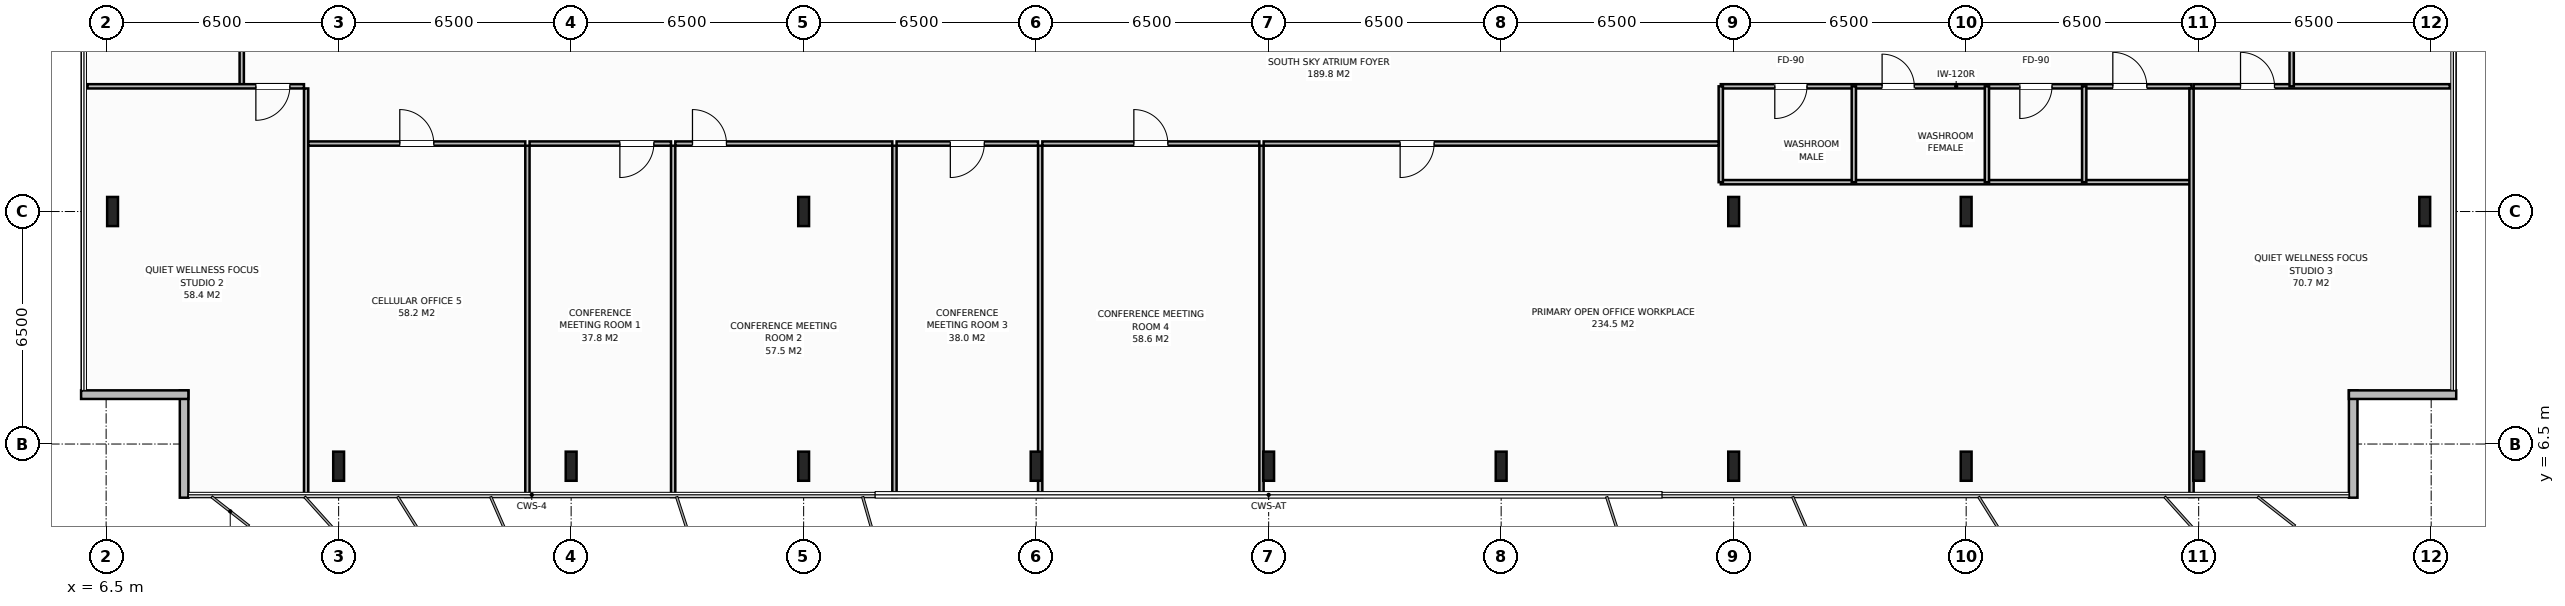
"""IFC4 building model, lengths in metres.
Left out: names, types, materials, properties, quantities, classifications, styles, units other than length and angle.
Written with IfcOpenShell. Run it as: python <this file> out.ifc"""

import sys

from ifc_helpers import new_model, si_unit, direction, frame, frame_2d, origin, origin_2d, place, context, subcontext, project, spatial, rectangle, i_section, extrude, element, fill, save


model = new_model("IFC4")
c1 = context("Model", 3, precision=1e-05, world=origin(), true_north=direction((0.0, 1.0)))
c2 = subcontext(c1, "Body", "Model", "MODEL_VIEW")
j1 = project(units=[si_unit("LENGTHUNIT", "METRE"), si_unit("PLANEANGLEUNIT", "RADIAN")], contexts=[c1])
p1 = place(None, origin())
s1 = spatial("IfcSite", under=j1, at=p1, CompositionType="ELEMENT")
p2 = place(p1, origin())
s2 = spatial("IfcBuilding", under=s1, at=p2, CompositionType="ELEMENT")
p3 = place(p2, frame((0.0, 0.0, 221.4)))
s3 = spatial("IfcBuildingStorey", under=s2, at=p3, CompositionType="ELEMENT", Elevation=221.4)
for number, where, z_axis, x_axis in (
    (1, (58.5, 13.0, 0.0), (0.0, 0.0, 1.0), (1.0, 0.0, 0.0)),
    (2, (26.0, 13.0, 0.0), (0.0, 0.0, 1.0), (1.0, 0.0, 0.0)),
    (3, (52.0, 13.0, 0.0), (0.0, 0.0, 1.0), (1.0, 0.0, 0.0)),
    (4, (13.0, 5.88, 0.0), (0.0, 0.0, 1.0), (1.0, 0.0, 0.0)),
    (5, (19.5, 5.88, 0.0), (0.0, 0.0, 1.0), (1.0, 0.0, 0.0)),
    (6, (26.0, 5.88, 0.0), (0.0, 0.0, 1.0), (1.0, 0.0, 0.0)),
    (7, (32.5, 5.88, 0.0), (0.0, 0.0, 1.0), (1.0, 0.0, 0.0)),
    (8, (39.0, 5.88, 0.0), (0.0, 0.0, 1.0), (1.0, 0.0, 0.0)),
    (9, (45.5, 5.88, 0.0), (0.0, 0.0, 1.0), (1.0, 0.0, 0.0)),
    (10, (52.0, 5.88, 0.0), (0.0, 0.0, 1.0), (1.0, 0.0, 0.0)),
    (11, (58.5, 5.88, 0.0), (0.0, 0.0, 1.0), (1.0, 0.0, 0.0)),
    (12, (65.0, 5.88, 0.0), (0.0, 0.0, 1.0), (1.0, 0.0, 0.0)),
    (13, (6.68, 13.0, 0.0), (0.0, 0.0, 1.0), (1.0, 0.0, 0.0)),
    (14, (71.32, 13.0, 0.0), (0.0, 0.0, 1.0), (1.0, 0.0, 0.0)),
):
    element("IfcColumn", number, at=place(p3, frame(where, z_axis=z_axis, x_axis=x_axis)), inside=s3, PredefinedType="COLUMN", context=c2, shape_type="SweptSolid", body=[
        extrude(i_section(OverallWidth=0.303, OverallDepth=0.814, WebThickness=0.021, FlangeThickness=0.04, at=origin_2d()), origin(), (0.0, 0.0, 1.0), 3.8),
    ])
for number, where, z_axis, x_axis in (
    (15, (8.68, 5.0, 0.0), (0.0, 0.0, 1.0), (0.0, 1.0, 0.0)),
    (16, (8.8, 7.88, 0.0), (0.0, 0.0, 1.0), (-1.0, 0.0, 0.0)),
    (17, (69.32, 8.0, 0.0), (0.0, 0.0, 1.0), (0.0, -1.0, 0.0)),
    (18, (72.2, 7.88, 0.0), (0.0, 0.0, 1.0), (-1.0, 0.0, 0.0)),
):
    element("IfcWall", number, at=place(p3, frame(where, z_axis=z_axis, x_axis=x_axis)), inside=s3, PredefinedType="STANDARD", context=c2, shape_type="SweptSolid", body=[
        extrude(rectangle(XDim=3.0, YDim=0.24, at=frame_2d((1.5, 0.0))), origin(), (0.0, 0.0, 1.0), 3.58),
    ])
p4 = place(p3, frame((10.291, 16.5, 0.0), z_axis=(0.0, 0.0, 1.0), x_axis=(0.0, 1.0, 0.0)))
e19 = element("IfcWall", 19, at=p4, inside=s3, PredefinedType="PARTITIONING", context=c2, shape_type="SweptSolid", body=[
    extrude(rectangle(XDim=2.1, YDim=0.12, at=frame_2d((1.05, 0.0))), origin(), (0.0, 0.0, 1.0), 3.58),
])
p5 = place(p3, frame((51.64, 16.5, 0.0), z_axis=(0.0, 0.0, 1.0), x_axis=(1.0, 0.0, 0.0)))
e20 = element("IfcWall", 20, at=p5, inside=s3, PredefinedType="PARTITIONING", context=c2, shape_type="SweptSolid", body=[
    extrude(rectangle(XDim=13.16, YDim=0.12, at=frame_2d((6.58, 0.0))), origin(), (0.0, 0.0, 1.0), 3.58),
])
p6 = place(p5, frame((1.51, 0.0, 0.0)))
e21 = element("IfcOpeningElement", 21, at=p6, cuts=e20, PredefinedType="OPENING", context=c2, shape_type="SweptSolid", body=[
    extrude(rectangle(XDim=0.9, YDim=2.15, at=frame_2d((0.45, 1.075))), frame((0.0, 0.07, 0.0), z_axis=(0.0, -1.0, 0.0), x_axis=(1.0, 0.0, 0.0)), (0.0, 0.0, 1.0), 0.14),
])
p7 = place(p5, frame((4.51, 0.0, 0.0)))
e22 = element("IfcOpeningElement", 22, at=p7, cuts=e20, PredefinedType="OPENING", context=c2, shape_type="SweptSolid", body=[
    extrude(rectangle(XDim=0.9, YDim=2.15, at=frame_2d((0.45, 1.075))), frame((0.0, 0.07, 0.0), z_axis=(0.0, -1.0, 0.0), x_axis=(1.0, 0.0, 0.0)), (0.0, 0.0, 1.0), 0.14),
])
p8 = place(p5, frame((8.36, 0.0, 0.0)))
e23 = element("IfcOpeningElement", 23, at=p8, cuts=e20, PredefinedType="OPENING", context=c2, shape_type="SweptSolid", body=[
    extrude(rectangle(XDim=0.9, YDim=2.15, at=frame_2d((0.45, 1.075))), frame((0.0, 0.07, 0.0), z_axis=(0.0, -1.0, 0.0), x_axis=(1.0, 0.0, 0.0)), (0.0, 0.0, 1.0), 0.14),
])
p9 = place(p5, frame((10.96, 0.0, 0.0)))
e24 = element("IfcOpeningElement", 24, at=p9, cuts=e20, PredefinedType="OPENING", context=c2, shape_type="SweptSolid", body=[
    extrude(rectangle(XDim=0.95, YDim=2.15, at=frame_2d((0.475, 1.075))), frame((0.0, 0.07, 0.0), z_axis=(0.0, -1.0, 0.0), x_axis=(1.0, 0.0, 0.0)), (0.0, 0.0, 1.0), 0.14),
])
p10 = place(p3, frame((51.64, 13.82, 0.0), z_axis=(0.0, 0.0, 1.0), x_axis=(1.0, 0.0, 0.0)))
e25 = element("IfcWall", 25, at=p10, inside=s3, PredefinedType="PARTITIONING", context=c2, shape_type="SweptSolid", body=[
    extrude(rectangle(XDim=13.16, YDim=0.12, at=frame_2d((6.58, 0.0))), origin(), (0.0, 0.0, 1.0), 3.58),
])
for number, where, z_axis, x_axis in (
    (26, (51.64, 13.82, 0.0), (0.0, 0.0, 1.0), (0.0, 1.0, 0.0)),
    (27, (55.36, 13.82, 0.0), (0.0, 0.0, 1.0), (0.0, 1.0, 0.0)),
    (28, (59.08, 13.82, 0.0), (0.0, 0.0, 1.0), (0.0, 1.0, 0.0)),
    (29, (61.8, 13.82, 0.0), (0.0, 0.0, 1.0), (0.0, 1.0, 0.0)),
):
    element("IfcWall", number, at=place(p3, frame(where, z_axis=z_axis, x_axis=x_axis)), inside=s3, PredefinedType="PARTITIONING", context=c2, shape_type="SweptSolid", body=[
        extrude(rectangle(XDim=2.68, YDim=0.12, at=frame_2d((1.34, 0.0))), origin(), (0.0, 0.0, 1.0), 3.58),
    ])
p11 = place(p3, frame((12.091, 5.02, 0.0), z_axis=(0.0, 0.0, 1.0), x_axis=(0.0, 1.0, 0.0)))
e30 = element("IfcWall", 30, at=p11, inside=s3, PredefinedType="PARTITIONING", context=c2, shape_type="SweptSolid", body=[
    extrude(rectangle(XDim=11.42, YDim=0.12, at=frame_2d((5.71, 0.0))), origin(), (0.0, 0.0, 1.0), 3.58),
])
p12 = place(p3, frame((5.98, 16.5, 0.0), z_axis=(0.0, 0.0, 1.0), x_axis=(1.0, 0.0, 0.0)))
e31 = element("IfcWall", 31, at=p12, inside=s3, PredefinedType="PARTITIONING", context=c2, shape_type="SweptSolid", body=[
    extrude(rectangle(XDim=6.051, YDim=0.12, at=frame_2d((3.026, 0.0))), origin(), (0.0, 0.0, 1.0), 3.58),
])
p13 = place(p12, frame((4.706, 0.0, 0.0)))
e32 = element("IfcOpeningElement", 32, at=p13, cuts=e31, PredefinedType="OPENING", context=c2, shape_type="SweptSolid", body=[
    extrude(rectangle(XDim=0.95, YDim=2.15, at=frame_2d((0.475, 1.075))), frame((0.0, 0.07, 0.0), z_axis=(0.0, -1.0, 0.0), x_axis=(1.0, 0.0, 0.0)), (0.0, 0.0, 1.0), 0.14),
])
p14 = place(p3, frame((18.278, 5.02, 0.0), z_axis=(0.0, 0.0, 1.0), x_axis=(0.0, 1.0, 0.0)))
e33 = element("IfcWall", 33, at=p14, inside=s3, PredefinedType="PARTITIONING", context=c2, shape_type="SweptSolid", body=[
    extrude(rectangle(XDim=9.82, YDim=0.12, at=frame_2d((4.91, 0.0))), origin(), (0.0, 0.0, 1.0), 3.58),
])
p15 = place(p3, frame((12.151, 14.9, 0.0), z_axis=(0.0, 0.0, 1.0), x_axis=(1.0, 0.0, 0.0)))
e34 = element("IfcWall", 34, at=p15, inside=s3, PredefinedType="PARTITIONING", context=c2, shape_type="SweptSolid", body=[
    extrude(rectangle(XDim=6.067, YDim=0.12, at=frame_2d((3.033, 0.0))), origin(), (0.0, 0.0, 1.0), 3.58),
])
p16 = place(p15, frame((2.558, 0.0, 0.0)))
e35 = element("IfcOpeningElement", 35, at=p16, cuts=e34, PredefinedType="OPENING", context=c2, shape_type="SweptSolid", body=[
    extrude(rectangle(XDim=0.95, YDim=2.15, at=frame_2d((0.475, 1.075))), frame((0.0, 0.07, 0.0), z_axis=(0.0, -1.0, 0.0), x_axis=(1.0, 0.0, 0.0)), (0.0, 0.0, 1.0), 0.14),
])
p17 = place(p3, frame((22.352, 5.02, 0.0), z_axis=(0.0, 0.0, 1.0), x_axis=(0.0, 1.0, 0.0)))
e36 = element("IfcWall", 36, at=p17, inside=s3, PredefinedType="PARTITIONING", context=c2, shape_type="SweptSolid", body=[
    extrude(rectangle(XDim=9.82, YDim=0.12, at=frame_2d((4.91, 0.0))), origin(), (0.0, 0.0, 1.0), 3.58),
])
p18 = place(p3, frame((18.338, 14.9, 0.0), z_axis=(0.0, 0.0, 1.0), x_axis=(1.0, 0.0, 0.0)))
e37 = element("IfcWall", 37, at=p18, inside=s3, PredefinedType="PARTITIONING", context=c2, shape_type="SweptSolid", body=[
    extrude(rectangle(XDim=3.954, YDim=0.12, at=frame_2d((1.977, 0.0))), origin(), (0.0, 0.0, 1.0), 3.58),
])
p19 = place(p18, frame((2.524, 0.0, 0.0)))
e38 = element("IfcOpeningElement", 38, at=p19, cuts=e37, PredefinedType="OPENING", context=c2, shape_type="SweptSolid", body=[
    extrude(rectangle(XDim=0.95, YDim=2.15, at=frame_2d((0.475, 1.075))), frame((0.0, 0.07, 0.0), z_axis=(0.0, -1.0, 0.0), x_axis=(1.0, 0.0, 0.0)), (0.0, 0.0, 1.0), 0.14),
])
p20 = place(p3, frame((28.539, 5.02, 0.0), z_axis=(0.0, 0.0, 1.0), x_axis=(0.0, 1.0, 0.0)))
e39 = element("IfcWall", 39, at=p20, inside=s3, PredefinedType="PARTITIONING", context=c2, shape_type="SweptSolid", body=[
    extrude(rectangle(XDim=9.82, YDim=0.12, at=frame_2d((4.91, 0.0))), origin(), (0.0, 0.0, 1.0), 3.58),
])
p21 = place(p3, frame((22.412, 14.9, 0.0), z_axis=(0.0, 0.0, 1.0), x_axis=(1.0, 0.0, 0.0)))
e40 = element("IfcWall", 40, at=p21, inside=s3, PredefinedType="PARTITIONING", context=c2, shape_type="SweptSolid", body=[
    extrude(rectangle(XDim=6.067, YDim=0.12, at=frame_2d((3.033, 0.0))), origin(), (0.0, 0.0, 1.0), 3.58),
])
p22 = place(p21, frame((0.48, 0.0, 0.0)))
e41 = element("IfcOpeningElement", 41, at=p22, cuts=e40, PredefinedType="OPENING", context=c2, shape_type="SweptSolid", body=[
    extrude(rectangle(XDim=0.95, YDim=2.15, at=frame_2d((0.475, 1.075))), frame((0.0, 0.07, 0.0), z_axis=(0.0, -1.0, 0.0), x_axis=(1.0, 0.0, 0.0)), (0.0, 0.0, 1.0), 0.14),
])
p23 = place(p3, frame((32.613, 5.02, 0.0), z_axis=(0.0, 0.0, 1.0), x_axis=(0.0, 1.0, 0.0)))
e42 = element("IfcWall", 42, at=p23, inside=s3, PredefinedType="PARTITIONING", context=c2, shape_type="SweptSolid", body=[
    extrude(rectangle(XDim=9.82, YDim=0.12, at=frame_2d((4.91, 0.0))), origin(), (0.0, 0.0, 1.0), 2.88),
])
p24 = place(p3, frame((28.599, 14.9, 0.0), z_axis=(0.0, 0.0, 1.0), x_axis=(1.0, 0.0, 0.0)))
e43 = element("IfcWall", 43, at=p24, inside=s3, PredefinedType="PARTITIONING", context=c2, shape_type="SweptSolid", body=[
    extrude(rectangle(XDim=3.954, YDim=0.12, at=frame_2d((1.977, 0.0))), origin(), (0.0, 0.0, 1.0), 3.58),
])
p25 = place(p24, frame((1.502, 0.0, 0.0)))
e44 = element("IfcOpeningElement", 44, at=p25, cuts=e43, PredefinedType="OPENING", context=c2, shape_type="SweptSolid", body=[
    extrude(rectangle(XDim=0.95, YDim=2.15, at=frame_2d((0.475, 1.075))), frame((0.0, 0.07, 0.0), z_axis=(0.0, -1.0, 0.0), x_axis=(1.0, 0.0, 0.0)), (0.0, 0.0, 1.0), 0.14),
])
p26 = place(p3, frame((38.8, 5.02, 0.0), z_axis=(0.0, 0.0, 1.0), x_axis=(0.0, 1.0, 0.0)))
e45 = element("IfcWall", 45, at=p26, inside=s3, PredefinedType="PARTITIONING", context=c2, shape_type="SweptSolid", body=[
    extrude(rectangle(XDim=9.82, YDim=0.12, at=frame_2d((4.91, 0.0))), origin(), (0.0, 0.0, 1.0), 2.88),
])
p27 = place(p3, frame((32.673, 14.9, 0.0), z_axis=(0.0, 0.0, 1.0), x_axis=(1.0, 0.0, 0.0)))
e46 = element("IfcWall", 46, at=p27, inside=s3, PredefinedType="PARTITIONING", context=c2, shape_type="SweptSolid", body=[
    extrude(rectangle(XDim=6.067, YDim=0.12, at=frame_2d((3.033, 0.0))), origin(), (0.0, 0.0, 1.0), 3.58),
])
p28 = place(p27, frame((2.558, 0.0, 0.0)))
e47 = element("IfcOpeningElement", 47, at=p28, cuts=e46, PredefinedType="OPENING", context=c2, shape_type="SweptSolid", body=[
    extrude(rectangle(XDim=0.95, YDim=2.15, at=frame_2d((0.475, 1.075))), frame((0.0, 0.07, 0.0), z_axis=(0.0, -1.0, 0.0), x_axis=(1.0, 0.0, 0.0)), (0.0, 0.0, 1.0), 0.14),
])
p29 = place(p3, frame((64.8, 5.02, 0.0), z_axis=(0.0, 0.0, 1.0), x_axis=(0.0, 1.0, 0.0)))
e48 = element("IfcWall", 48, at=p29, inside=s3, PredefinedType="PARTITIONING", context=c2, shape_type="SweptSolid", body=[
    extrude(rectangle(XDim=11.42, YDim=0.12, at=frame_2d((5.71, 0.0))), origin(), (0.0, 0.0, 1.0), 2.88),
])
p30 = place(p3, frame((38.86, 14.9, 0.0), z_axis=(0.0, 0.0, 1.0), x_axis=(1.0, 0.0, 0.0)))
e49 = element("IfcWall", 49, at=p30, inside=s3, PredefinedType="PARTITIONING", context=c2, shape_type="SweptSolid", body=[
    extrude(rectangle(XDim=12.72, YDim=0.12, at=frame_2d((6.36, 0.0))), origin(), (0.0, 0.0, 1.0), 3.58),
])
p31 = place(p30, frame((3.816, 0.0, 0.0)))
e50 = element("IfcOpeningElement", 50, at=p31, cuts=e49, PredefinedType="OPENING", context=c2, shape_type="SweptSolid", body=[
    extrude(rectangle(XDim=0.95, YDim=2.15, at=frame_2d((0.475, 1.075))), frame((0.0, 0.07, 0.0), z_axis=(0.0, -1.0, 0.0), x_axis=(1.0, 0.0, 0.0)), (0.0, 0.0, 1.0), 0.14),
])
p32 = place(p3, frame((64.86, 16.5, 0.0), z_axis=(0.0, 0.0, 1.0), x_axis=(1.0, 0.0, 0.0)))
e51 = element("IfcWall", 51, at=p32, inside=s3, PredefinedType="PARTITIONING", context=c2, shape_type="SweptSolid", body=[
    extrude(rectangle(XDim=7.16, YDim=0.12, at=frame_2d((3.58, 0.0))), origin(), (0.0, 0.0, 1.0), 3.58),
])
p33 = place(p32, frame((1.31, 0.0, 0.0)))
e52 = element("IfcOpeningElement", 52, at=p33, cuts=e51, PredefinedType="OPENING", context=c2, shape_type="SweptSolid", body=[
    extrude(rectangle(XDim=0.95, YDim=2.15, at=frame_2d((0.475, 1.075))), frame((0.0, 0.07, 0.0), z_axis=(0.0, -1.0, 0.0), x_axis=(1.0, 0.0, 0.0)), (0.0, 0.0, 1.0), 0.14),
])
p34 = place(p3, frame((67.6, 16.5, 0.0), z_axis=(0.0, 0.0, 1.0), x_axis=(0.0, 1.0, 0.0)))
e53 = element("IfcWall", 53, at=p34, inside=s3, PredefinedType="PARTITIONING", context=c2, shape_type="SweptSolid", body=[
    extrude(rectangle(XDim=19.0, YDim=0.12, at=frame_2d((9.5, 0.0))), origin(), (0.0, 0.0, 1.0), 3.58),
])
p35 = place(p34, frame((9.025, 0.0, 0.0)))
e54 = element("IfcOpeningElement", 54, at=p35, cuts=e53, PredefinedType="OPENING", context=c2, shape_type="SweptSolid", body=[
    extrude(rectangle(XDim=0.95, YDim=2.15, at=frame_2d((0.475, 1.075))), frame((0.0, 0.07, 0.0), z_axis=(0.0, -1.0, 0.0), x_axis=(1.0, 0.0, 0.0)), (0.0, 0.0, 1.0), 0.14),
])
p36 = place(p6, origin())
e55 = element("IfcDoor", 55, at=p36, inside=s3, OperationType="SINGLE_SWING_RIGHT", PredefinedType="DOOR", context=c2, shape_type="SweptSolid", body=[
    extrude(rectangle(XDim=0.9, YDim=2.15, at=frame_2d((0.45, 1.075))), frame((0.0, 0.025, 0.0), z_axis=(0.0, -1.0, 0.0), x_axis=(1.0, 0.0, 0.0)), (0.0, 0.0, 1.0), 0.05),
])
fill(e21, e55)
p37 = place(p7, origin())
e56 = element("IfcDoor", 56, at=p37, inside=s3, OperationType="SINGLE_SWING_LEFT", PredefinedType="DOOR", context=c2, shape_type="SweptSolid", body=[
    extrude(rectangle(XDim=0.9, YDim=2.15, at=frame_2d((0.45, 1.075))), frame((0.0, 0.025, 0.0), z_axis=(0.0, -1.0, 0.0), x_axis=(1.0, 0.0, 0.0)), (0.0, 0.0, 1.0), 0.05),
])
fill(e22, e56)
p38 = place(p8, origin())
e57 = element("IfcDoor", 57, at=p38, inside=s3, OperationType="SINGLE_SWING_RIGHT", PredefinedType="DOOR", context=c2, shape_type="SweptSolid", body=[
    extrude(rectangle(XDim=0.9, YDim=2.15, at=frame_2d((0.45, 1.075))), frame((0.0, 0.025, 0.0), z_axis=(0.0, -1.0, 0.0), x_axis=(1.0, 0.0, 0.0)), (0.0, 0.0, 1.0), 0.05),
])
fill(e23, e57)
p39 = place(p9, origin())
e58 = element("IfcDoor", 58, at=p39, inside=s3, OperationType="SINGLE_SWING_LEFT", PredefinedType="DOOR", context=c2, shape_type="SweptSolid", body=[
    extrude(rectangle(XDim=0.95, YDim=2.15, at=frame_2d((0.475, 1.075))), frame((0.0, 0.025, 0.0), z_axis=(0.0, -1.0, 0.0), x_axis=(1.0, 0.0, 0.0)), (0.0, 0.0, 1.0), 0.05),
])
fill(e24, e58)
p40 = place(p13, origin())
e59 = element("IfcDoor", 59, at=p40, inside=s3, OperationType="SINGLE_SWING_RIGHT", PredefinedType="DOOR", context=c2, shape_type="SweptSolid", body=[
    extrude(rectangle(XDim=0.95, YDim=2.15, at=frame_2d((0.475, 1.075))), frame((0.0, 0.025, 0.0), z_axis=(0.0, -1.0, 0.0), x_axis=(1.0, 0.0, 0.0)), (0.0, 0.0, 1.0), 0.05),
])
fill(e32, e59)
p41 = place(p16, origin())
e60 = element("IfcDoor", 60, at=p41, inside=s3, OperationType="SINGLE_SWING_LEFT", PredefinedType="DOOR", context=c2, shape_type="SweptSolid", body=[
    extrude(rectangle(XDim=0.95, YDim=2.15, at=frame_2d((0.475, 1.075))), frame((0.0, 0.025, 0.0), z_axis=(0.0, -1.0, 0.0), x_axis=(1.0, 0.0, 0.0)), (0.0, 0.0, 1.0), 0.05),
])
fill(e35, e60)
p42 = place(p19, origin())
e61 = element("IfcDoor", 61, at=p42, inside=s3, OperationType="SINGLE_SWING_RIGHT", PredefinedType="DOOR", context=c2, shape_type="SweptSolid", body=[
    extrude(rectangle(XDim=0.95, YDim=2.15, at=frame_2d((0.475, 1.075))), frame((0.0, 0.025, 0.0), z_axis=(0.0, -1.0, 0.0), x_axis=(1.0, 0.0, 0.0)), (0.0, 0.0, 1.0), 0.05),
])
fill(e38, e61)
p43 = place(p22, origin())
e62 = element("IfcDoor", 62, at=p43, inside=s3, OperationType="SINGLE_SWING_LEFT", PredefinedType="DOOR", context=c2, shape_type="SweptSolid", body=[
    extrude(rectangle(XDim=0.95, YDim=2.15, at=frame_2d((0.475, 1.075))), frame((0.0, 0.025, 0.0), z_axis=(0.0, -1.0, 0.0), x_axis=(1.0, 0.0, 0.0)), (0.0, 0.0, 1.0), 0.05),
])
fill(e41, e62)
p44 = place(p25, origin())
e63 = element("IfcDoor", 63, at=p44, inside=s3, OperationType="SINGLE_SWING_RIGHT", PredefinedType="DOOR", context=c2, shape_type="SweptSolid", body=[
    extrude(rectangle(XDim=0.95, YDim=2.15, at=frame_2d((0.475, 1.075))), frame((0.0, 0.025, 0.0), z_axis=(0.0, -1.0, 0.0), x_axis=(1.0, 0.0, 0.0)), (0.0, 0.0, 1.0), 0.05),
])
fill(e44, e63)
p45 = place(p28, origin())
e64 = element("IfcDoor", 64, at=p45, inside=s3, OperationType="SINGLE_SWING_LEFT", PredefinedType="DOOR", context=c2, shape_type="SweptSolid", body=[
    extrude(rectangle(XDim=0.95, YDim=2.15, at=frame_2d((0.475, 1.075))), frame((0.0, 0.025, 0.0), z_axis=(0.0, -1.0, 0.0), x_axis=(1.0, 0.0, 0.0)), (0.0, 0.0, 1.0), 0.05),
])
fill(e47, e64)
p46 = place(p31, origin())
e65 = element("IfcDoor", 65, at=p46, inside=s3, OperationType="SINGLE_SWING_RIGHT", PredefinedType="DOOR", context=c2, shape_type="SweptSolid", body=[
    extrude(rectangle(XDim=0.95, YDim=2.15, at=frame_2d((0.475, 1.075))), frame((0.0, 0.025, 0.0), z_axis=(0.0, -1.0, 0.0), x_axis=(1.0, 0.0, 0.0)), (0.0, 0.0, 1.0), 0.05),
])
fill(e50, e65)
p47 = place(p33, origin())
e66 = element("IfcDoor", 66, at=p47, inside=s3, OperationType="SINGLE_SWING_LEFT", PredefinedType="DOOR", context=c2, shape_type="SweptSolid", body=[
    extrude(rectangle(XDim=0.95, YDim=2.15, at=frame_2d((0.475, 1.075))), frame((0.0, 0.025, 0.0), z_axis=(0.0, -1.0, 0.0), x_axis=(1.0, 0.0, 0.0)), (0.0, 0.0, 1.0), 0.05),
])
fill(e52, e66)
save(model, sys.argv[1])
